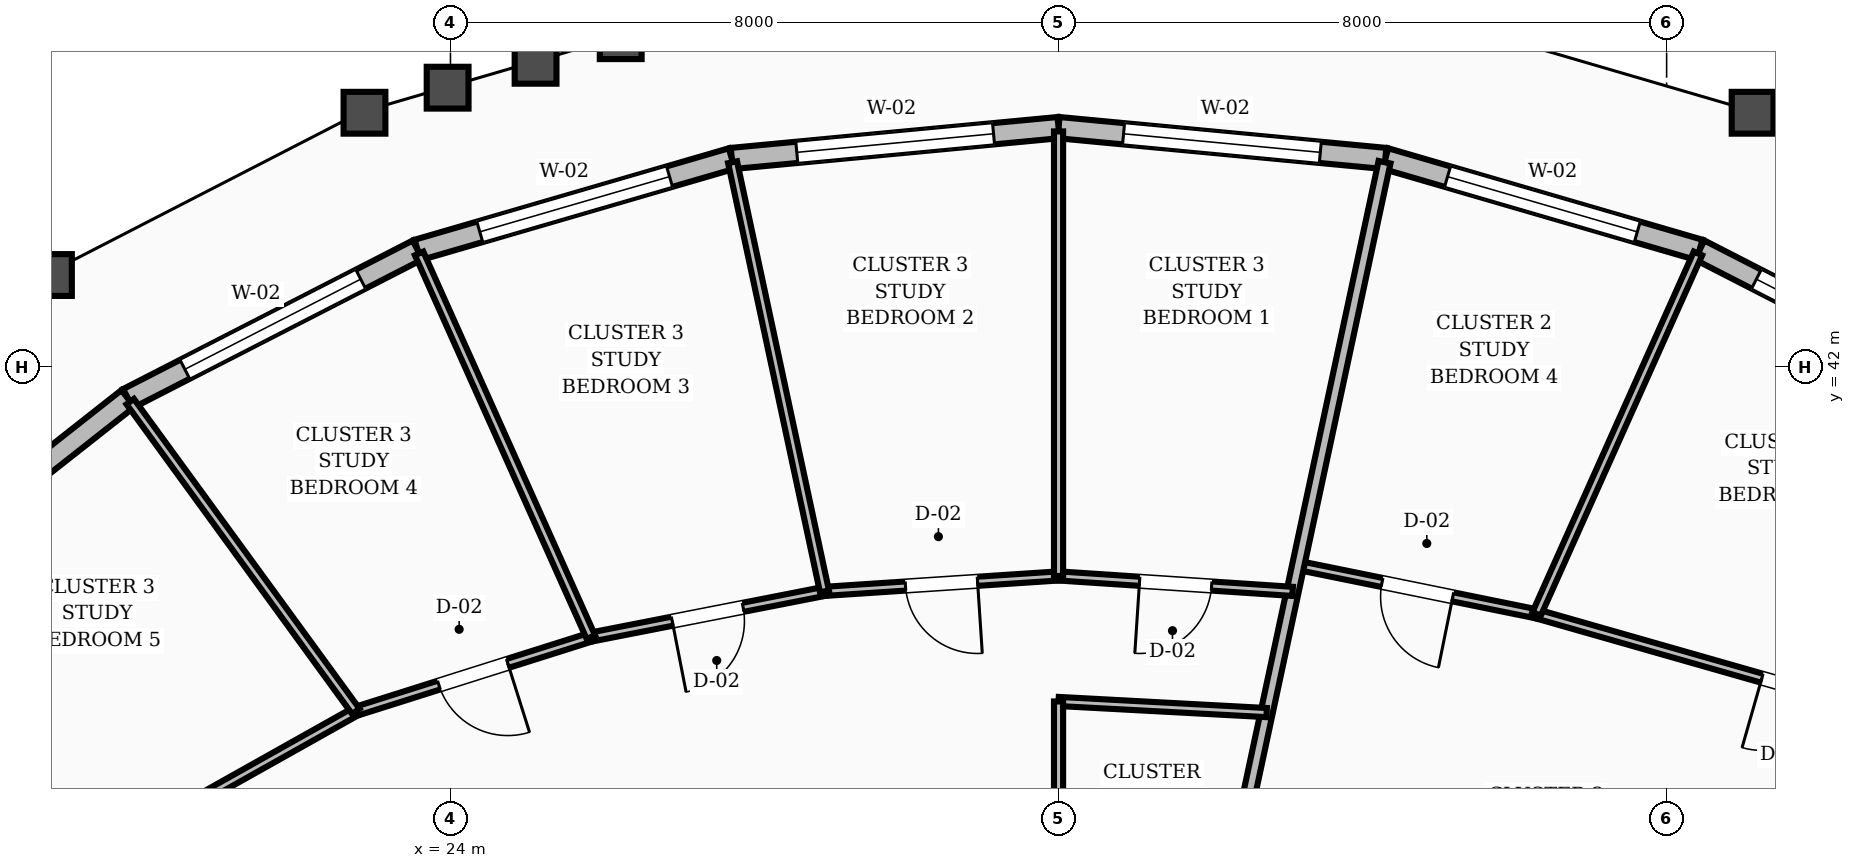
"""IFC4 building model, lengths in metres.
Left out: names, types, materials, properties, quantities, classifications, styles, units other than length and angle.
Written with IfcOpenShell. Run it as: python <this file> out.ifc"""

import sys

from ifc_helpers import new_model, si_unit, direction, frame, frame_2d, origin, place, context, subcontext, project, spatial, rectangle, extrude, element, fill, save


model = new_model("IFC4")
c1 = context("Model", 3, precision=1e-05, world=origin(), true_north=direction((0.0, 1.0)))
c2 = subcontext(c1, "Body", "Model", "MODEL_VIEW")
j1 = project(units=[si_unit("LENGTHUNIT", "METRE"), si_unit("PLANEANGLEUNIT", "RADIAN")], contexts=[c1])
p1 = place(None, origin())
s1 = spatial("IfcSite", under=j1, at=p1, CompositionType="ELEMENT")
p2 = place(p1, origin())
s2 = spatial("IfcBuilding", under=s1, at=p2, CompositionType="ELEMENT")
p3 = place(p2, frame((0.0, 0.0, 236.4)))
s3 = spatial("IfcBuildingStorey", under=s2, at=p3, CompositionType="ELEMENT", Elevation=236.4)
p4 = place(p3, frame((44.243, 41.582, 0.0), z_axis=(0.0, 0.0, 1.0), x_axis=(-0.889784216581, 0.456381471933, 0.0)))
e1 = element("IfcWall", 1, at=p4, inside=s3, PredefinedType="STANDARD", context=c2, shape_type="SweptSolid", body=[
    extrude(rectangle(XDim=4.282, YDim=0.28, at=frame_2d((2.141, 0.0))), origin(), (0.0, 0.0, 1.0), 2.88),
])
p5 = place(p4, frame((0.841, 0.0, 0.8)))
e2 = element("IfcOpeningElement", 2, at=p5, cuts=e1, PredefinedType="OPENING", context=c2, shape_type="SweptSolid", body=[
    extrude(rectangle(XDim=2.6, YDim=1.65, at=frame_2d((1.3, 0.825))), frame((0.0, 0.15, 0.0), z_axis=(0.0, -1.0, 0.0), x_axis=(1.0, 0.0, 0.0)), (0.0, 0.0, 1.0), 0.3),
])
p6 = place(p3, frame((40.433, 43.536, 0.0), z_axis=(0.0, 0.0, 1.0), x_axis=(-0.960144675866, 0.279503490866, 0.0)))
e3 = element("IfcWall", 3, at=p6, inside=s3, PredefinedType="STANDARD", context=c2, shape_type="SweptSolid", body=[
    extrude(rectangle(XDim=4.305, YDim=0.28, at=frame_2d((2.153, 0.0))), origin(), (0.0, 0.0, 1.0), 2.88),
])
p7 = place(p6, frame((0.853, 0.0, 0.8)))
e4 = element("IfcOpeningElement", 4, at=p7, cuts=e3, PredefinedType="OPENING", context=c2, shape_type="SweptSolid", body=[
    extrude(rectangle(XDim=2.6, YDim=1.65, at=frame_2d((1.3, 0.825))), frame((0.0, 0.15, 0.0), z_axis=(0.0, -1.0, 0.0), x_axis=(1.0, 0.0, 0.0)), (0.0, 0.0, 1.0), 0.3),
])
p8 = place(p3, frame((36.299, 44.74, 0.0), z_axis=(0.0, 0.0, 1.0), x_axis=(-0.995564827598, 0.094078021076, 0.0)))
e5 = element("IfcWall", 5, at=p8, inside=s3, PredefinedType="STANDARD", context=c2, shape_type="SweptSolid", body=[
    extrude(rectangle(XDim=4.318, YDim=0.28, at=frame_2d((2.159, 0.0))), origin(), (0.0, 0.0, 1.0), 2.88),
])
p9 = place(p8, frame((0.859, 0.0, 0.8)))
e6 = element("IfcOpeningElement", 6, at=p9, cuts=e5, PredefinedType="OPENING", context=c2, shape_type="SweptSolid", body=[
    extrude(rectangle(XDim=2.6, YDim=1.65, at=frame_2d((1.3, 0.825))), frame((0.0, 0.15, 0.0), z_axis=(0.0, -1.0, 0.0), x_axis=(1.0, 0.0, 0.0)), (0.0, 0.0, 1.0), 0.3),
])
p10 = place(p3, frame((32.0, 45.146, 0.0), z_axis=(0.0, 0.0, 1.0), x_axis=(-0.995564827598, -0.094078021076, 0.0)))
e7 = element("IfcWall", 7, at=p10, inside=s3, PredefinedType="STANDARD", context=c2, shape_type="SweptSolid", body=[
    extrude(rectangle(XDim=4.318, YDim=0.28, at=frame_2d((2.159, 0.0))), origin(), (0.0, 0.0, 1.0), 2.88),
])
p11 = place(p10, frame((0.859, 0.0, 0.8)))
e8 = element("IfcOpeningElement", 8, at=p11, cuts=e7, PredefinedType="OPENING", context=c2, shape_type="SweptSolid", body=[
    extrude(rectangle(XDim=2.6, YDim=1.65, at=frame_2d((1.3, 0.825))), frame((0.0, 0.15, 0.0), z_axis=(0.0, -1.0, 0.0), x_axis=(1.0, 0.0, 0.0)), (0.0, 0.0, 1.0), 0.3),
])
p12 = place(p3, frame((27.701, 44.74, 0.0), z_axis=(0.0, 0.0, 1.0), x_axis=(-0.960144675866, -0.279503490866, 0.0)))
e9 = element("IfcWall", 9, at=p12, inside=s3, PredefinedType="STANDARD", context=c2, shape_type="SweptSolid", body=[
    extrude(rectangle(XDim=4.305, YDim=0.28, at=frame_2d((2.153, 0.0))), origin(), (0.0, 0.0, 1.0), 2.88),
])
p13 = place(p12, frame((0.853, 0.0, 0.8)))
e10 = element("IfcOpeningElement", 10, at=p13, cuts=e9, PredefinedType="OPENING", context=c2, shape_type="SweptSolid", body=[
    extrude(rectangle(XDim=2.6, YDim=1.65, at=frame_2d((1.3, 0.825))), frame((0.0, 0.15, 0.0), z_axis=(0.0, -1.0, 0.0), x_axis=(1.0, 0.0, 0.0)), (0.0, 0.0, 1.0), 0.3),
])
p14 = place(p3, frame((23.567, 43.536, 0.0), z_axis=(0.0, 0.0, 1.0), x_axis=(-0.889784216581, -0.456381471933, 0.0)))
e11 = element("IfcWall", 11, at=p14, inside=s3, PredefinedType="STANDARD", context=c2, shape_type="SweptSolid", body=[
    extrude(rectangle(XDim=4.282, YDim=0.28, at=frame_2d((2.141, 0.0))), origin(), (0.0, 0.0, 1.0), 2.88),
])
p15 = place(p14, frame((0.841, 0.0, 0.8)))
e12 = element("IfcOpeningElement", 12, at=p15, cuts=e11, PredefinedType="OPENING", context=c2, shape_type="SweptSolid", body=[
    extrude(rectangle(XDim=2.6, YDim=1.65, at=frame_2d((1.3, 0.825))), frame((0.0, 0.15, 0.0), z_axis=(0.0, -1.0, 0.0), x_axis=(1.0, 0.0, 0.0)), (0.0, 0.0, 1.0), 0.3),
])
p16 = place(p3, frame((19.757, 41.582, 0.0), z_axis=(0.0, 0.0, 1.0), x_axis=(-0.78564818009, -0.618673530322, 0.0)))
e13 = element("IfcWall", 13, at=p16, inside=s3, PredefinedType="STANDARD", context=c2, shape_type="SweptSolid", body=[
    extrude(rectangle(XDim=4.25, YDim=0.28, at=frame_2d((2.125, 0.0))), origin(), (0.0, 0.0, 1.0), 2.88),
])
p17 = place(p3, frame((45.13, 36.796, 0.0), z_axis=(0.0, 0.0, 1.0), x_axis=(-0.961595149336, 0.274471799595, 0.0)))
e14 = element("IfcWall", 14, at=p17, inside=s3, PredefinedType="PARTITIONING", context=c2, shape_type="SweptSolid", body=[
    extrude(rectangle(XDim=7.113, YDim=0.12, at=frame_2d((3.557, 0.0))), origin(), (0.0, 0.0, 1.0), 2.87),
])
p18 = place(p17, frame((3.082, 0.0, 0.0)))
e15 = element("IfcOpeningElement", 15, at=p18, cuts=e14, PredefinedType="OPENING", context=c2, shape_type="SweptSolid", body=[
    extrude(rectangle(XDim=0.95, YDim=2.1, at=frame_2d((0.475, 1.05))), frame((0.0, 0.07, 0.0), z_axis=(0.0, -1.0, 0.0), x_axis=(1.0, 0.0, 0.0)), (0.0, 0.0, 1.0), 0.14),
])
p19 = place(p3, frame((38.29, 38.749, 0.0), z_axis=(0.0, 0.0, 1.0), x_axis=(-0.9799449922, 0.199268191799, 0.0)))
e16 = element("IfcWall", 16, at=p19, inside=s3, PredefinedType="PARTITIONING", context=c2, shape_type="SweptSolid", body=[
    extrude(rectangle(XDim=3.201, YDim=0.12, at=frame_2d((1.601, 0.0))), origin(), (0.0, 0.0, 1.0), 2.87),
])
p20 = place(p19, frame((1.125, 0.0, 0.0)))
e17 = element("IfcOpeningElement", 17, at=p20, cuts=e16, PredefinedType="OPENING", context=c2, shape_type="SweptSolid", body=[
    extrude(rectangle(XDim=0.95, YDim=2.1, at=frame_2d((0.475, 1.05))), frame((0.0, 0.07, 0.0), z_axis=(0.0, -1.0, 0.0), x_axis=(1.0, 0.0, 0.0)), (0.0, 0.0, 1.0), 0.14),
])
p21 = place(p3, frame((38.29, 38.749, 0.0), z_axis=(0.0, 0.0, 1.0), x_axis=(0.408591704735, 0.912717272118, 0.0)))
e18 = element("IfcWall", 18, at=p21, inside=s3, PredefinedType="PARTITIONING", context=c2, shape_type="SweptSolid", body=[
    extrude(rectangle(XDim=5.195, YDim=0.12, at=frame_2d((2.598, 0.0))), origin(), (0.0, 0.0, 1.0), 2.87),
])
p22 = place(p3, frame((33.86, 33.35, 0.0), z_axis=(0.0, 0.0, 1.0), x_axis=(0.209408330321, 0.97782828308, 0.0)))
e19 = element("IfcWall", 19, at=p22, inside=s3, PredefinedType="SOLIDWALL", context=c2, shape_type="SweptSolid", body=[
    extrude(rectangle(XDim=11.598, YDim=0.16, at=frame_2d((5.799, 0.0))), origin(), (0.0, 0.0, 1.0), 2.87),
])
p23 = place(p3, frame((34.738, 37.45, 0.0), z_axis=(0.0, 0.0, 1.0), x_axis=(-0.998571697587, 0.053428127212, 0.0)))
e20 = element("IfcWall", 20, at=p23, inside=s3, PredefinedType="PARTITIONING", context=c2, shape_type="SweptSolid", body=[
    extrude(rectangle(XDim=2.742, YDim=0.12, at=frame_2d((1.371, 0.0))), origin(), (0.0, 0.0, 1.0), 2.87),
])
p24 = place(p3, frame((32.0, 33.35, 0.0), z_axis=(0.0, 0.0, 1.0), x_axis=(0.0, 1.0, 0.0)))
e21 = element("IfcWall", 21, at=p24, inside=s3, PredefinedType="PARTITIONING", context=c2, shape_type="SweptSolid", body=[
    extrude(rectangle(XDim=4.247, YDim=0.12, at=frame_2d((2.123, 0.0))), origin(), (0.0, 0.0, 1.0), 2.87),
])
p25 = place(p24, frame((0.44, 0.0, 0.0)))
e22 = element("IfcOpeningElement", 22, at=p25, cuts=e21, PredefinedType="OPENING", context=c2, shape_type="SweptSolid", body=[
    extrude(rectangle(XDim=0.86, YDim=2.1, at=frame_2d((0.43, 1.05))), frame((0.0, 0.07, 0.0), z_axis=(0.0, -1.0, 0.0), x_axis=(1.0, 0.0, 0.0)), (0.0, 0.0, 1.0), 0.14),
])
p26 = place(p3, frame((35.08, 39.045, 0.0), z_axis=(0.0, 0.0, 1.0), x_axis=(-0.997831812847, 0.065815448572, 0.0)))
e23 = element("IfcWall", 23, at=p26, inside=s3, PredefinedType="PARTITIONING", context=c2, shape_type="SweptSolid", body=[
    extrude(rectangle(XDim=3.086, YDim=0.12, at=frame_2d((1.543, 0.0))), origin(), (0.0, 0.0, 1.0), 2.87),
])
p27 = place(p26, frame((1.068, 0.0, 0.0)))
e24 = element("IfcOpeningElement", 24, at=p27, cuts=e23, PredefinedType="OPENING", context=c2, shape_type="SweptSolid", body=[
    extrude(rectangle(XDim=0.95, YDim=2.1, at=frame_2d((0.475, 1.05))), frame((0.0, 0.07, 0.0), z_axis=(0.0, -1.0, 0.0), x_axis=(1.0, 0.0, 0.0)), (0.0, 0.0, 1.0), 0.14),
])
p28 = place(p3, frame((32.0, 39.248, 0.0), z_axis=(0.0, 0.0, 1.0), x_axis=(-0.997831812847, -0.065815448572, 0.0)))
e25 = element("IfcWall", 25, at=p28, inside=s3, PredefinedType="PARTITIONING", context=c2, shape_type="SweptSolid", body=[
    extrude(rectangle(XDim=3.086, YDim=0.12, at=frame_2d((1.543, 0.0))), origin(), (0.0, 0.0, 1.0), 2.87),
])
p29 = place(p28, frame((1.068, 0.0, 0.0)))
e26 = element("IfcOpeningElement", 26, at=p29, cuts=e25, PredefinedType="OPENING", context=c2, shape_type="SweptSolid", body=[
    extrude(rectangle(XDim=0.95, YDim=2.1, at=frame_2d((0.475, 1.05))), frame((0.0, 0.07, 0.0), z_axis=(0.0, -1.0, 0.0), x_axis=(1.0, 0.0, 0.0)), (0.0, 0.0, 1.0), 0.14),
])
p30 = place(p3, frame((32.0, 39.248, 0.0), z_axis=(0.0, 0.0, 1.0), x_axis=(0.0, 1.0, 0.0)))
e27 = element("IfcWall", 27, at=p30, inside=s3, PredefinedType="PARTITIONING", context=c2, shape_type="SweptSolid", body=[
    extrude(rectangle(XDim=5.848, YDim=0.12, at=frame_2d((2.924, 0.0))), origin(), (0.0, 0.0, 1.0), 2.87),
])
p31 = place(p3, frame((28.92, 39.045, 0.0), z_axis=(0.0, 0.0, 1.0), x_axis=(-0.981361344244, -0.192171569238, 0.0)))
e28 = element("IfcWall", 28, at=p31, inside=s3, PredefinedType="PARTITIONING", context=c2, shape_type="SweptSolid", body=[
    extrude(rectangle(XDim=3.132, YDim=0.12, at=frame_2d((1.566, 0.0))), origin(), (0.0, 0.0, 1.0), 2.87),
])
p32 = place(p31, frame((1.091, 0.0, 0.0)))
e29 = element("IfcOpeningElement", 29, at=p32, cuts=e28, PredefinedType="OPENING", context=c2, shape_type="SweptSolid", body=[
    extrude(rectangle(XDim=0.95, YDim=2.1, at=frame_2d((0.475, 1.05))), frame((0.0, 0.07, 0.0), z_axis=(0.0, -1.0, 0.0), x_axis=(1.0, 0.0, 0.0)), (0.0, 0.0, 1.0), 0.14),
])
p33 = place(p3, frame((28.92, 39.045, 0.0), z_axis=(0.0, 0.0, 1.0), x_axis=(-0.209384705961, 0.977833342094, 0.0)))
e30 = element("IfcWall", 30, at=p33, inside=s3, PredefinedType="PARTITIONING", context=c2, shape_type="SweptSolid", body=[
    extrude(rectangle(XDim=5.774, YDim=0.12, at=frame_2d((2.887, 0.0))), origin(), (0.0, 0.0, 1.0), 2.87),
])
p34 = place(p3, frame((25.847, 38.443, 0.0), z_axis=(0.0, 0.0, 1.0), x_axis=(-0.953534866418, -0.301282688726, 0.0)))
e31 = element("IfcWall", 31, at=p34, inside=s3, PredefinedType="PARTITIONING", context=c2, shape_type="SweptSolid", body=[
    extrude(rectangle(XDim=3.243, YDim=0.12, at=frame_2d((1.622, 0.0))), origin(), (0.0, 0.0, 1.0), 2.87),
])
p35 = place(p34, frame((1.146, 0.0, 0.0)))
e32 = element("IfcOpeningElement", 32, at=p35, cuts=e31, PredefinedType="OPENING", context=c2, shape_type="SweptSolid", body=[
    extrude(rectangle(XDim=0.95, YDim=2.1, at=frame_2d((0.475, 1.05))), frame((0.0, 0.07, 0.0), z_axis=(0.0, -1.0, 0.0), x_axis=(1.0, 0.0, 0.0)), (0.0, 0.0, 1.0), 0.14),
])
p36 = place(p3, frame((25.847, 38.443, 0.0), z_axis=(0.0, 0.0, 1.0), x_axis=(-0.408610947291, 0.912708657653, 0.0)))
e33 = element("IfcWall", 33, at=p36, inside=s3, PredefinedType="PARTITIONING", context=c2, shape_type="SweptSolid", body=[
    extrude(rectangle(XDim=5.53, YDim=0.12, at=frame_2d((2.765, 0.0))), origin(), (0.0, 0.0, 1.0), 2.87),
])
p37 = place(p3, frame((22.755, 37.466, 0.0), z_axis=(0.0, 0.0, 1.0), x_axis=(-0.872022279864, -0.489466182102, 0.0)))
e34 = element("IfcWall", 34, at=p37, inside=s3, PredefinedType="PARTITIONING", context=c2, shape_type="SweptSolid", body=[
    extrude(rectangle(XDim=7.029, YDim=0.12, at=frame_2d((3.515, 0.0))), origin(), (0.0, 0.0, 1.0), 2.87),
])
p38 = place(p37, frame((3.04, 0.0, 0.0)))
e35 = element("IfcOpeningElement", 35, at=p38, cuts=e34, PredefinedType="OPENING", context=c2, shape_type="SweptSolid", body=[
    extrude(rectangle(XDim=0.95, YDim=2.1, at=frame_2d((0.475, 1.05))), frame((0.0, 0.07, 0.0), z_axis=(0.0, -1.0, 0.0), x_axis=(1.0, 0.0, 0.0)), (0.0, 0.0, 1.0), 0.14),
])
p39 = place(p3, frame((22.755, 37.466, 0.0), z_axis=(0.0, 0.0, 1.0), x_axis=(-0.588684040903, 0.808363222806, 0.0)))
e36 = element("IfcWall", 36, at=p39, inside=s3, PredefinedType="PARTITIONING", context=c2, shape_type="SweptSolid", body=[
    extrude(rectangle(XDim=5.042, YDim=0.12, at=frame_2d((2.521, 0.0))), origin(), (0.0, 0.0, 1.0), 2.87),
])
p40 = place(p5, origin())
e37 = element("IfcWindow", 37, at=p40, inside=s3, PartitioningType="SINGLE_PANEL", PredefinedType="WINDOW", context=c2, shape_type="SweptSolid", body=[
    extrude(rectangle(XDim=2.6, YDim=1.65, at=frame_2d((1.3, 0.825))), frame((0.0, 0.03, 0.0), z_axis=(0.0, -1.0, 0.0), x_axis=(1.0, 0.0, 0.0)), (0.0, 0.0, 1.0), 0.06),
])
fill(e2, e37)
p41 = place(p7, origin())
e38 = element("IfcWindow", 38, at=p41, inside=s3, PartitioningType="SINGLE_PANEL", PredefinedType="WINDOW", context=c2, shape_type="SweptSolid", body=[
    extrude(rectangle(XDim=2.6, YDim=1.65, at=frame_2d((1.3, 0.825))), frame((0.0, 0.03, 0.0), z_axis=(0.0, -1.0, 0.0), x_axis=(1.0, 0.0, 0.0)), (0.0, 0.0, 1.0), 0.06),
])
fill(e4, e38)
p42 = place(p9, origin())
e39 = element("IfcWindow", 39, at=p42, inside=s3, PartitioningType="SINGLE_PANEL", PredefinedType="WINDOW", context=c2, shape_type="SweptSolid", body=[
    extrude(rectangle(XDim=2.6, YDim=1.65, at=frame_2d((1.3, 0.825))), frame((0.0, 0.03, 0.0), z_axis=(0.0, -1.0, 0.0), x_axis=(1.0, 0.0, 0.0)), (0.0, 0.0, 1.0), 0.06),
])
fill(e6, e39)
p43 = place(p11, origin())
e40 = element("IfcWindow", 40, at=p43, inside=s3, PartitioningType="SINGLE_PANEL", PredefinedType="WINDOW", context=c2, shape_type="SweptSolid", body=[
    extrude(rectangle(XDim=2.6, YDim=1.65, at=frame_2d((1.3, 0.825))), frame((0.0, 0.03, 0.0), z_axis=(0.0, -1.0, 0.0), x_axis=(1.0, 0.0, 0.0)), (0.0, 0.0, 1.0), 0.06),
])
fill(e8, e40)
p44 = place(p13, origin())
e41 = element("IfcWindow", 41, at=p44, inside=s3, PartitioningType="SINGLE_PANEL", PredefinedType="WINDOW", context=c2, shape_type="SweptSolid", body=[
    extrude(rectangle(XDim=2.6, YDim=1.65, at=frame_2d((1.3, 0.825))), frame((0.0, 0.03, 0.0), z_axis=(0.0, -1.0, 0.0), x_axis=(1.0, 0.0, 0.0)), (0.0, 0.0, 1.0), 0.06),
])
fill(e10, e41)
p45 = place(p15, origin())
e42 = element("IfcWindow", 42, at=p45, inside=s3, PartitioningType="SINGLE_PANEL", PredefinedType="WINDOW", context=c2, shape_type="SweptSolid", body=[
    extrude(rectangle(XDim=2.6, YDim=1.65, at=frame_2d((1.3, 0.825))), frame((0.0, 0.03, 0.0), z_axis=(0.0, -1.0, 0.0), x_axis=(1.0, 0.0, 0.0)), (0.0, 0.0, 1.0), 0.06),
])
fill(e12, e42)
p46 = place(p18, origin())
e43 = element("IfcDoor", 43, at=p46, inside=s3, OperationType="SINGLE_SWING_RIGHT", PredefinedType="DOOR", context=c2, shape_type="SweptSolid", body=[
    extrude(rectangle(XDim=0.95, YDim=2.1, at=frame_2d((0.475, 1.05))), frame((0.0, 0.025, 0.0), z_axis=(0.0, -1.0, 0.0), x_axis=(1.0, 0.0, 0.0)), (0.0, 0.0, 1.0), 0.05),
])
fill(e15, e43)
p47 = place(p20, origin())
e44 = element("IfcDoor", 44, at=p47, inside=s3, OperationType="SINGLE_SWING_LEFT", PredefinedType="DOOR", context=c2, shape_type="SweptSolid", body=[
    extrude(rectangle(XDim=0.95, YDim=2.1, at=frame_2d((0.475, 1.05))), frame((0.0, 0.025, 0.0), z_axis=(0.0, -1.0, 0.0), x_axis=(1.0, 0.0, 0.0)), (0.0, 0.0, 1.0), 0.05),
])
fill(e17, e44)
p48 = place(p27, origin())
e45 = element("IfcDoor", 45, at=p48, inside=s3, OperationType="SINGLE_SWING_RIGHT", PredefinedType="DOOR", context=c2, shape_type="SweptSolid", body=[
    extrude(rectangle(XDim=0.95, YDim=2.1, at=frame_2d((0.475, 1.05))), frame((0.0, 0.025, 0.0), z_axis=(0.0, -1.0, 0.0), x_axis=(1.0, 0.0, 0.0)), (0.0, 0.0, 1.0), 0.05),
])
fill(e24, e45)
p49 = place(p29, origin())
e46 = element("IfcDoor", 46, at=p49, inside=s3, OperationType="SINGLE_SWING_LEFT", PredefinedType="DOOR", context=c2, shape_type="SweptSolid", body=[
    extrude(rectangle(XDim=0.95, YDim=2.1, at=frame_2d((0.475, 1.05))), frame((0.0, 0.025, 0.0), z_axis=(0.0, -1.0, 0.0), x_axis=(1.0, 0.0, 0.0)), (0.0, 0.0, 1.0), 0.05),
])
fill(e26, e46)
p50 = place(p32, origin())
e47 = element("IfcDoor", 47, at=p50, inside=s3, OperationType="SINGLE_SWING_RIGHT", PredefinedType="DOOR", context=c2, shape_type="SweptSolid", body=[
    extrude(rectangle(XDim=0.95, YDim=2.1, at=frame_2d((0.475, 1.05))), frame((0.0, 0.025, 0.0), z_axis=(0.0, -1.0, 0.0), x_axis=(1.0, 0.0, 0.0)), (0.0, 0.0, 1.0), 0.05),
])
fill(e29, e47)
p51 = place(p35, origin())
e48 = element("IfcDoor", 48, at=p51, inside=s3, OperationType="SINGLE_SWING_LEFT", PredefinedType="DOOR", context=c2, shape_type="SweptSolid", body=[
    extrude(rectangle(XDim=0.95, YDim=2.1, at=frame_2d((0.475, 1.05))), frame((0.0, 0.025, 0.0), z_axis=(0.0, -1.0, 0.0), x_axis=(1.0, 0.0, 0.0)), (0.0, 0.0, 1.0), 0.05),
])
fill(e32, e48)
save(model, sys.argv[1])
